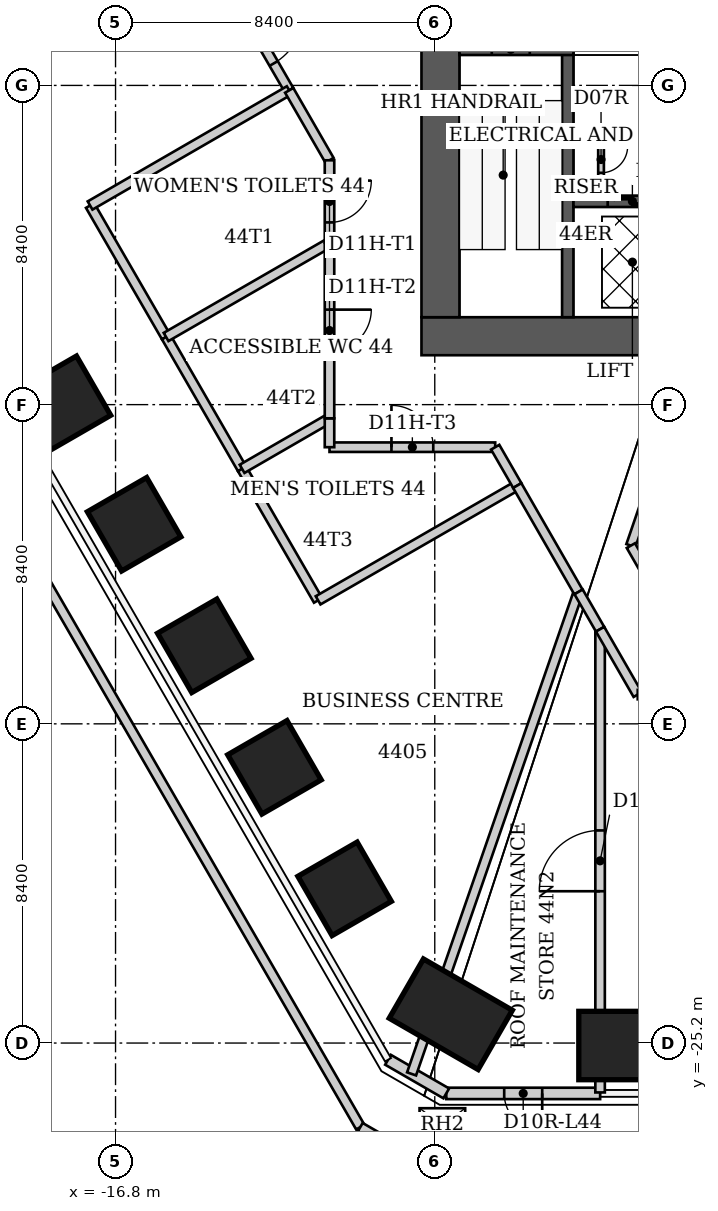
"""IFC4 building model, lengths in metres.
Left out: names, types, materials, properties, quantities, classifications, styles, units other than length and angle.
Written with IfcOpenShell. Run it as: python <this file> out.ifc"""

import sys

from ifc_helpers import new_model, si_unit, direction, frame, frame_2d, origin, origin_2d, place, context, subcontext, project, spatial, rectangle, extrude, clip, halfspace, element, fill, save


model = new_model("IFC4")
c1 = context("Model", 3, precision=1e-05, world=origin(), true_north=direction((0.0, 1.0)))
c2 = subcontext(c1, "Body", "Model", "MODEL_VIEW")
j1 = project(units=[si_unit("LENGTHUNIT", "METRE"), si_unit("PLANEANGLEUNIT", "RADIAN")], contexts=[c1])
p1 = place(None, origin())
s1 = spatial("IfcSite", under=j1, at=p1, CompositionType="ELEMENT")
p2 = place(p1, origin())
s2 = spatial("IfcBuilding", under=s1, at=p2, CompositionType="ELEMENT")
p3 = place(p2, frame((0.0, 0.0, 178.2)))
s3 = spatial("IfcBuildingStorey", under=s2, at=p3, CompositionType="ELEMENT", Elevation=178.2)
p4 = place(p3, frame((-3.71, -25.265, -0.061), z_axis=(0.0, 0.0, 1.0), x_axis=(0.0, -1.0, 0.0)))
e1 = element("IfcColumn", 1, at=p4, inside=s3, PredefinedType="COLUMN", context=c2, shape_type="SweptSolid", body=[
    clip(extrude(rectangle(XDim=1.8, YDim=1.8, at=origin_2d()), origin(), (0.0, 0.0, 1.0), 5.061), halfspace(frame((0.0, 0.0, 0.061)), True)),
])
p5 = place(p3, frame((-7.979, -24.442, -0.071), z_axis=(0.0, 0.0, 1.0), x_axis=(-0.5, -0.866025403784, 0.0)))
e2 = element("IfcColumn", 2, at=p5, inside=s3, PredefinedType="COLUMN", context=c2, shape_type="SweptSolid", body=[
    clip(extrude(rectangle(XDim=1.8, YDim=2.7, at=origin_2d()), origin(), (0.0, 0.0, 1.0), 5.071), halfspace(frame((0.0, 0.0, 0.071)), True)),
])
p6 = place(p3, frame((-10.772, -21.142, -0.07), z_axis=(0.0, 0.0, 1.0), x_axis=(-0.866025403784, -0.5, 0.0)))
e3 = element("IfcColumn", 3, at=p6, inside=s3, PredefinedType="COLUMN", context=c2, shape_type="SweptSolid", body=[
    clip(extrude(rectangle(XDim=1.8, YDim=1.8, at=origin_2d()), origin(), (0.0, 0.0, 1.0), 5.07), halfspace(frame((0.0, 0.0, 0.07)), True)),
])
p7 = place(p3, frame((-12.618, -17.945, -0.062), z_axis=(0.0, 0.0, 1.0), x_axis=(-0.866025403784, -0.5, 0.0)))
e4 = element("IfcColumn", 4, at=p7, inside=s3, PredefinedType="COLUMN", context=c2, shape_type="SweptSolid", body=[
    clip(extrude(rectangle(XDim=1.8, YDim=1.8, at=origin_2d()), origin(), (0.0, 0.0, 1.0), 5.062), halfspace(frame((0.0, 0.0, 0.062)), True)),
])
p8 = place(p3, frame((-14.465, -14.747, -0.054), z_axis=(0.0, 0.0, 1.0), x_axis=(-0.866025403784, -0.5, 0.0)))
e5 = element("IfcColumn", 5, at=p8, inside=s3, PredefinedType="COLUMN", context=c2, shape_type="SweptSolid", body=[
    clip(extrude(rectangle(XDim=1.8, YDim=1.8, at=origin_2d()), origin(), (0.0, 0.0, 1.0), 5.054), halfspace(frame((0.0, 0.0, 0.054)), True)),
])
for number, where, z_axis, x_axis in (
    (6, (-16.311, -11.549, -0.046), (0.0, 0.0, 1.0), (-0.866, -0.5, 0.0)),
    (7, (-18.157, -8.351, -0.046), (0.0, 0.0, 1.0), (-0.866, -0.5, 0.0)),
):
    element("IfcColumn", number, at=place(p3, frame(where, z_axis=z_axis, x_axis=x_axis)), inside=s3, PredefinedType="COLUMN", context=c2, shape_type="SweptSolid", body=[
        clip(extrude(rectangle(XDim=1.8, YDim=1.8, at=origin_2d()), origin(), (0.0, 0.0, 1.0), 5.046), halfspace(frame((0.0, 0.0, 0.046)), True)),
    ])
p9 = place(p3, frame((-8.75, -6.6, 0.0), z_axis=(0.0, 0.0, 1.0), x_axis=(1.0, 0.0, 0.0)))
e8 = element("IfcWall", 8, at=p9, inside=s3, PredefinedType="SHEAR", context=c2, shape_type="SweptSolid", body=[
    extrude(rectangle(XDim=17.5, YDim=1.0, at=frame_2d((8.75, 0.0))), origin(), (0.0, 0.0, 1.0), 5.0),
])
p10 = place(p3, frame((-8.25, -6.1, 0.0), z_axis=(0.0, 0.0, 1.0), x_axis=(0.0, 1.0, 0.0)))
e9 = element("IfcWall", 9, at=p10, inside=s3, PredefinedType="SHEAR", context=c2, shape_type="SweptSolid", body=[
    extrude(rectangle(XDim=12.2, YDim=1.0, at=frame_2d((6.1, 0.0))), origin(), (0.0, 0.0, 1.0), 5.0),
])
p11 = place(p10, frame((7.6, 0.0, 0.0)))
e10 = element("IfcOpeningElement", 10, at=p11, cuts=e9, PredefinedType="OPENING", context=c2, shape_type="SweptSolid", body=[
    extrude(rectangle(XDim=1.2, YDim=2.2, at=frame_2d((0.6, 1.1))), frame((0.0, 0.5, 0.0), z_axis=(0.0, -1.0, 0.0), x_axis=(1.0, 0.0, 0.0)), (0.0, 0.0, 1.0), 1.0),
])
p12 = place(p3, frame((-4.9, -6.1, 0.0), z_axis=(0.0, 0.0, 1.0), x_axis=(0.0, 1.0, 0.0)))
e11 = element("IfcWall", 11, at=p12, inside=s3, PredefinedType="SHEAR", context=c2, shape_type="SweptSolid", body=[
    extrude(rectangle(XDim=7.2, YDim=0.3, at=frame_2d((3.6, 0.0))), origin(), (0.0, 0.0, 1.0), 5.0),
])
p13 = place(p3, frame((-7.75, 0.95, 0.0), z_axis=(0.0, 0.0, 1.0), x_axis=(1.0, 0.0, 0.0)))
e12 = element("IfcWall", 12, at=p13, inside=s3, PredefinedType="SHEAR", context=c2, shape_type="SweptSolid", body=[
    extrude(rectangle(XDim=3.0, YDim=0.3, at=frame_2d((1.5, 0.0))), origin(), (0.0, 0.0, 1.0), 5.0),
])
p14 = place(p13, frame((0.85, 0.0, 0.0)))
e13 = element("IfcOpeningElement", 13, at=p14, cuts=e12, PredefinedType="OPENING", context=c2, shape_type="SweptSolid", body=[
    extrude(rectangle(XDim=1.0, YDim=2.2, at=frame_2d((0.5, 1.1))), frame((0.0, 0.15, 0.0), z_axis=(0.0, -1.0, 0.0), x_axis=(1.0, 0.0, 0.0)), (0.0, 0.0, 1.0), 0.3),
])
p15 = place(p3, frame((-4.75, -3.05, 0.0), z_axis=(0.0, 0.0, 1.0), x_axis=(1.0, 0.0, 0.0)))
e14 = element("IfcWall", 14, at=p15, inside=s3, PredefinedType="SHEAR", context=c2, shape_type="SweptSolid", body=[
    extrude(rectangle(XDim=3.1, YDim=0.3, at=frame_2d((1.55, 0.0))), origin(), (0.0, 0.0, 1.0), 5.0),
])
p16 = place(p15, frame((0.9, 0.0, 0.0)))
e15 = element("IfcOpeningElement", 15, at=p16, cuts=e14, PredefinedType="OPENING", context=c2, shape_type="SweptSolid", body=[
    extrude(rectangle(XDim=1.3, YDim=2.1, at=frame_2d((0.65, 1.05))), frame((0.0, 0.15, 0.0), z_axis=(0.0, -1.0, 0.0), x_axis=(1.0, 0.0, 0.0)), (0.0, 0.0, 1.0), 0.3),
])
p17 = place(p3, frame((-4.049, -26.525, 0.0), z_axis=(0.0, 0.0, 1.0), x_axis=(-1.0, 0.0, 0.0)))
e16 = element("IfcWall", 16, at=p17, inside=s3, PredefinedType="SOLIDWALL", context=c2, shape_type="SweptSolid", body=[
    extrude(rectangle(XDim=4.049, YDim=0.3, at=frame_2d((2.024, 0.0))), origin(), (0.0, 0.0, 1.0), 4.84),
])
p18 = place(p17, frame((1.524, 0.0, 0.0)))
e17 = element("IfcOpeningElement", 17, at=p18, cuts=e16, PredefinedType="OPENING", context=c2, shape_type="SweptSolid", body=[
    extrude(rectangle(XDim=1.0, YDim=2.2, at=frame_2d((0.5, 1.1))), frame((0.0, 0.15, 0.0), z_axis=(0.0, -1.0, 0.0), x_axis=(1.0, 0.0, 0.0)), (0.0, 0.0, 1.0), 0.3),
])
p19 = place(p3, frame((-8.097, -26.525, 0.0), z_axis=(0.0, 0.0, 1.0), x_axis=(-0.866036293601, 0.499981137809, 0.0)))
e18 = element("IfcWall", 18, at=p19, inside=s3, PredefinedType="SOLIDWALL", context=c2, shape_type="SweptSolid", body=[
    extrude(rectangle(XDim=1.77, YDim=0.3, at=frame_2d((0.885, 0.0))), origin(), (0.0, 0.0, 1.0), 4.84),
])
p20 = place(p3, frame((-28.919, 4.734, 0.0), z_axis=(0.0, 0.0, 1.0), x_axis=(0.500001430823, -0.866024577697, 0.0)))
e19 = element("IfcWall", 19, at=p20, inside=s3, PredefinedType="PARAPET", context=c2, shape_type="SweptSolid", body=[
    extrude(rectangle(XDim=37.119, YDim=0.25, at=frame_2d((18.56, 0.0))), origin(), (0.0, 0.0, 1.0), 1.1),
])
p21 = place(p3, frame((-10.36, -27.412, 0.0), z_axis=(0.0, 0.0, 1.0), x_axis=(0.865515622283, -0.500881929783, 0.0)))
e20 = element("IfcWall", 20, at=p21, inside=s3, PredefinedType="PARAPET", context=c2, shape_type="SweptSolid", body=[
    extrude(rectangle(XDim=1.871, YDim=0.25, at=frame_2d((0.935, 0.0))), origin(), (0.0, 0.0, 1.0), 1.1),
])
p22 = place(p3, frame((-17.47, -3.16, 0.0), z_axis=(0.0, 0.0, 1.0), x_axis=(0.50044857655, -0.865766263046, 0.0)))
e21 = element("IfcWall", 21, at=p22, inside=s3, PredefinedType="PARTITIONING", context=c2, shape_type="SweptSolid", body=[
    extrude(rectangle(XDim=3.996, YDim=0.25, at=frame_2d((1.998, 0.0))), origin(), (0.0, 0.0, 1.0), 4.84),
])
p23 = place(p3, frame((-15.47, -6.62, 0.0), z_axis=(0.0, 0.0, 1.0), x_axis=(0.499365324853, -0.866391523697, 0.0)))
e22 = element("IfcWall", 22, at=p23, inside=s3, PredefinedType="PARTITIONING", context=c2, shape_type="SweptSolid", body=[
    extrude(rectangle(XDim=4.005, YDim=0.25, at=frame_2d((2.002, 0.0))), origin(), (0.0, 0.0, 1.0), 4.84),
])
p24 = place(p3, frame((-13.85, 2.67, 0.0), z_axis=(0.0, 0.0, 1.0), x_axis=(0.50081313458, -0.865555431057, 0.0)))
e23 = element("IfcWall", 23, at=p24, inside=s3, PredefinedType="PARTITIONING", context=c2, shape_type="SweptSolid", body=[
    extrude(rectangle(XDim=3.235, YDim=0.25, at=frame_2d((1.617, 0.0))), origin(), (0.0, 0.0, 1.0), 4.84),
])
p25 = place(p24, frame((0.817, 0.0, 0.0)))
e24 = element("IfcOpeningElement", 24, at=p25, cuts=e23, PredefinedType="OPENING", context=c2, shape_type="SweptSolid", body=[
    extrude(rectangle(XDim=1.6, YDim=2.4, at=frame_2d((0.8, 1.2))), frame((0.0, 0.125, 0.0), z_axis=(0.0, -1.0, 0.0), x_axis=(1.0, 0.0, 0.0)), (0.0, 0.0, 1.0), 0.25),
])
p26 = place(p3, frame((-13.47, -10.09, 0.0), z_axis=(0.0, 0.0, 1.0), x_axis=(0.50044857655, -0.865766263046, 0.0)))
e25 = element("IfcWall", 25, at=p26, inside=s3, PredefinedType="PARTITIONING", context=c2, shape_type="SweptSolid", body=[
    extrude(rectangle(XDim=3.996, YDim=0.25, at=frame_2d((1.998, 0.0))), origin(), (0.0, 0.0, 1.0), 4.84),
])
p27 = place(p3, frame((-12.23, -0.13, 0.0), z_axis=(0.0, 0.0, 1.0), x_axis=(-0.865687585241, -0.500584662928, 0.0)))
e26 = element("IfcWall", 26, at=p27, inside=s3, PredefinedType="PARTITIONING", context=c2, shape_type="SweptSolid", body=[
    extrude(rectangle(XDim=6.053, YDim=0.25, at=frame_2d((3.026, 0.0))), origin(), (0.0, 0.0, 1.0), 4.84),
])
p28 = place(p3, frame((-12.23, -0.13, 0.0), z_axis=(0.0, 0.0, 1.0), x_axis=(0.499181595673, -0.866497394423, 0.0)))
e27 = element("IfcWall", 27, at=p28, inside=s3, PredefinedType="PARTITIONING", context=c2, shape_type="SweptSolid", body=[
    extrude(rectangle(XDim=2.124, YDim=0.25, at=frame_2d((1.062, 0.0))), origin(), (0.0, 0.0, 1.0), 4.84),
])
p29 = place(p3, frame((-11.47, -13.55, 0.0), z_axis=(0.0, 0.0, 1.0), x_axis=(0.866403916982, 0.499343822069, 0.0)))
e28 = element("IfcWall", 28, at=p29, inside=s3, PredefinedType="PARTITIONING", context=c2, shape_type="SweptSolid", body=[
    extrude(rectangle(XDim=6.048, YDim=0.25, at=frame_2d((3.024, 0.0))), origin(), (0.0, 0.0, 1.0), 4.84),
])
p30 = place(p3, frame((-11.17, -9.52, 0.0), z_axis=(0.0, 0.0, 1.0), x_axis=(1.0, 0.0, 0.0)))
e29 = element("IfcWall", 29, at=p30, inside=s3, PredefinedType="PARTITIONING", context=c2, shape_type="SweptSolid", body=[
    extrude(rectangle(XDim=4.36, YDim=0.25, at=frame_2d((2.18, 0.0))), origin(), (0.0, 0.0, 1.0), 4.84),
])
p31 = place(p30, frame((1.63, 0.0, 0.0)))
e30 = element("IfcOpeningElement", 30, at=p31, cuts=e29, PredefinedType="OPENING", context=c2, shape_type="SweptSolid", body=[
    extrude(rectangle(XDim=1.1, YDim=2.2, at=frame_2d((0.55, 1.1))), frame((0.0, 0.125, 0.0), z_axis=(0.0, -1.0, 0.0), x_axis=(1.0, 0.0, 0.0)), (0.0, 0.0, 1.0), 0.25),
])
p32 = place(p3, frame((-11.17, -8.76, 0.0), z_axis=(0.0, 0.0, 1.0), x_axis=(-0.865675724273, -0.500605174168, 0.0)))
e31 = element("IfcWall", 31, at=p32, inside=s3, PredefinedType="PARTITIONING", context=c2, shape_type="SweptSolid", body=[
    extrude(rectangle(XDim=2.657, YDim=0.25, at=frame_2d((1.329, 0.0))), origin(), (0.0, 0.0, 1.0), 4.84),
])
p33 = place(p3, frame((-11.17, -8.76, 0.0), z_axis=(0.0, 0.0, 1.0), x_axis=(0.0, -1.0, 0.0)))
e32 = element("IfcWall", 32, at=p33, inside=s3, PredefinedType="PARTITIONING", context=c2, shape_type="SweptSolid", body=[
    extrude(rectangle(XDim=0.76, YDim=0.25, at=frame_2d((0.38, 0.0))), origin(), (0.0, 0.0, 1.0), 4.84),
])
p34 = place(p3, frame((-11.17, -4.14, 0.0), z_axis=(0.0, 0.0, 1.0), x_axis=(-0.866235527521, -0.499635878276, 0.0)))
e33 = element("IfcWall", 33, at=p34, inside=s3, PredefinedType="PARTITIONING", context=c2, shape_type="SweptSolid", body=[
    extrude(rectangle(XDim=4.964, YDim=0.25, at=frame_2d((2.482, 0.0))), origin(), (0.0, 0.0, 1.0), 4.84),
])
p35 = place(p3, frame((-11.17, -4.14, 0.0), z_axis=(0.0, 0.0, 1.0), x_axis=(0.0, -1.0, 0.0)))
e34 = element("IfcWall", 34, at=p35, inside=s3, PredefinedType="PARTITIONING", context=c2, shape_type="SweptSolid", body=[
    extrude(rectangle(XDim=4.62, YDim=0.25, at=frame_2d((2.31, 0.0))), origin(), (0.0, 0.0, 1.0), 4.84),
])
p36 = place(p35, frame((1.76, 0.0, 0.0)))
e35 = element("IfcOpeningElement", 35, at=p36, cuts=e34, PredefinedType="OPENING", context=c2, shape_type="SweptSolid", body=[
    extrude(rectangle(XDim=1.1, YDim=2.2, at=frame_2d((0.55, 1.1))), frame((0.0, 0.125, 0.0), z_axis=(0.0, -1.0, 0.0), x_axis=(1.0, 0.0, 0.0)), (0.0, 0.0, 1.0), 0.25),
])
p37 = place(p3, frame((-11.17, -1.97, 0.0), z_axis=(0.0, 0.0, 1.0), x_axis=(0.0, -1.0, 0.0)))
e36 = element("IfcWall", 36, at=p37, inside=s3, PredefinedType="PARTITIONING", context=c2, shape_type="SweptSolid", body=[
    extrude(rectangle(XDim=2.17, YDim=0.25, at=frame_2d((1.085, 0.0))), origin(), (0.0, 0.0, 1.0), 4.84),
])
p38 = place(p37, frame((0.535, 0.0, 0.0)))
e37 = element("IfcOpeningElement", 37, at=p38, cuts=e36, PredefinedType="OPENING", context=c2, shape_type="SweptSolid", body=[
    extrude(rectangle(XDim=1.1, YDim=2.2, at=frame_2d((0.55, 1.1))), frame((0.0, 0.125, 0.0), z_axis=(0.0, -1.0, 0.0), x_axis=(1.0, 0.0, 0.0)), (0.0, 0.0, 1.0), 0.25),
])
p39 = place(p3, frame((-6.81, -9.52, 0.0), z_axis=(0.0, 0.0, 1.0), x_axis=(0.499341299954, -0.866405370575, 0.0)))
e38 = element("IfcWall", 38, at=p39, inside=s3, PredefinedType="PARTITIONING", context=c2, shape_type="SweptSolid", body=[
    extrude(rectangle(XDim=1.165, YDim=0.25, at=frame_2d((0.582, 0.0))), origin(), (0.0, 0.0, 1.0), 4.84),
])
p40 = place(p3, frame((-4.62, -13.33, 0.0), z_axis=(0.0, 0.0, 1.0), x_axis=(-0.327133057776, -0.944978286793, 0.0)))
e39 = element("IfcWall", 39, at=p40, inside=s3, PredefinedType="PARTITIONING", context=c2, shape_type="SweptSolid", body=[
    extrude(rectangle(XDim=13.42, YDim=0.25, at=frame_2d((6.71, 0.0))), origin(), (0.0, 0.0, 1.0), 4.84),
])
p41 = place(p3, frame((-4.62, -13.33, 0.0), z_axis=(0.0, 0.0, 1.0), x_axis=(-0.49848958573, 0.86689568745, 0.0)))
e40 = element("IfcWall", 40, at=p41, inside=s3, PredefinedType="PARTITIONING", context=c2, shape_type="SweptSolid", body=[
    extrude(rectangle(XDim=3.23, YDim=0.25, at=frame_2d((1.615, 0.0))), origin(), (0.0, 0.0, 1.0), 4.84),
])
p42 = place(p3, frame((-4.05, -26.5, 0.0), z_axis=(0.0, 0.0, 1.0), x_axis=(0.0, 1.0, 0.0)))
e41 = element("IfcWall", 41, at=p42, inside=s3, PredefinedType="PARTITIONING", context=c2, shape_type="SweptSolid", body=[
    extrude(rectangle(XDim=12.19, YDim=0.25, at=frame_2d((6.095, 0.0))), origin(), (0.0, 0.0, 1.0), 4.84),
])
p43 = place(p42, frame((5.295, 0.0, 0.0)))
e42 = element("IfcOpeningElement", 42, at=p43, cuts=e41, PredefinedType="OPENING", context=c2, shape_type="SweptSolid", body=[
    extrude(rectangle(XDim=1.6, YDim=2.4, at=frame_2d((0.8, 1.2))), frame((0.0, 0.125, 0.0), z_axis=(0.0, -1.0, 0.0), x_axis=(1.0, 0.0, 0.0)), (0.0, 0.0, 1.0), 0.25),
])
p44 = place(p3, frame((-4.05, -14.31, 0.0), z_axis=(0.0, 0.0, 1.0), x_axis=(-0.498895837979, 0.866661954194, 0.0)))
e43 = element("IfcWall", 43, at=p44, inside=s3, PredefinedType="PARTITIONING", context=c2, shape_type="SweptSolid", body=[
    extrude(rectangle(XDim=1.134, YDim=0.25, at=frame_2d((0.567, 0.0))), origin(), (0.0, 0.0, 1.0), 4.84),
])
p45 = place(p3, frame((-4.05, -14.31, 0.0), z_axis=(0.0, 0.0, 1.0), x_axis=(0.498852448655, -0.866686929907, 0.0)))
e44 = element("IfcWall", 44, at=p45, inside=s3, PredefinedType="PARTITIONING", context=c2, shape_type="SweptSolid", body=[
    extrude(rectangle(XDim=1.985, YDim=0.25, at=frame_2d((0.992, 0.0))), origin(), (0.0, 0.0, 1.0), 4.84),
])
p46 = place(p3, frame((-3.24, -12.11, 0.0), z_axis=(0.0, 0.0, 1.0), x_axis=(0.324932772994, 0.94573711624, 0.0)))
e45 = element("IfcWall", 45, at=p46, inside=s3, PredefinedType="PARTITIONING", context=c2, shape_type="SweptSolid", body=[
    extrude(rectangle(XDim=2.739, YDim=0.25, at=frame_2d((1.369, 0.0))), origin(), (0.0, 0.0, 1.0), 4.84),
])
p47 = place(p3, frame((-3.06, -16.03, 0.0), z_axis=(0.0, 0.0, 1.0), x_axis=(1.0, 0.0, 0.0)))
e46 = element("IfcWall", 46, at=p47, inside=s3, PredefinedType="PARTITIONING", context=c2, shape_type="SweptSolid", body=[
    extrude(rectangle(XDim=6.12, YDim=0.25, at=frame_2d((3.06, 0.0))), origin(), (0.0, 0.0, 1.0), 4.84),
])
p48 = place(p47, frame((2.51, 0.0, 0.0)))
e47 = element("IfcOpeningElement", 47, at=p48, cuts=e46, PredefinedType="OPENING", context=c2, shape_type="SweptSolid", body=[
    extrude(rectangle(XDim=1.1, YDim=2.2, at=frame_2d((0.55, 1.1))), frame((0.0, 0.125, 0.0), z_axis=(0.0, -1.0, 0.0), x_axis=(1.0, 0.0, 0.0)), (0.0, 0.0, 1.0), 0.25),
])
p49 = place(p3, frame((-2.02, -14.23, 0.0), z_axis=(0.0, 0.0, 1.0), x_axis=(-0.498748634132, 0.866746675766, 0.0)))
e48 = element("IfcWall", 48, at=p49, inside=s3, PredefinedType="PARTITIONING", context=c2, shape_type="SweptSolid", body=[
    extrude(rectangle(XDim=2.446, YDim=0.25, at=frame_2d((1.223, 0.0))), origin(), (0.0, 0.0, 1.0), 4.84),
])
p50 = place(p3, frame((-4.025, -2.9, 0.0), z_axis=(0.0, 0.0, 1.0), x_axis=(0.0, 1.0, 0.0)))
e49 = element("IfcWall", 49, at=p50, inside=s3, PredefinedType="PARTITIONING", context=c2, shape_type="SweptSolid", body=[
    extrude(rectangle(XDim=1.775, YDim=0.15, at=frame_2d((0.887, 0.0))), origin(), (0.0, 0.0, 1.0), 4.84),
])
p51 = place(p50, frame((0.6, 0.0, 0.0)))
e50 = element("IfcOpeningElement", 50, at=p51, cuts=e49, PredefinedType="OPENING", context=c2, shape_type="SweptSolid", body=[
    extrude(rectangle(XDim=0.7, YDim=2.1, at=frame_2d((0.35, 1.05))), frame((0.0, 0.075, 0.0), z_axis=(0.0, -1.0, 0.0), x_axis=(1.0, 0.0, 0.0)), (0.0, 0.0, 1.0), 0.15),
])
p52 = place(p3, frame((-4.75, -1.2, 0.0), z_axis=(0.0, 0.0, 1.0), x_axis=(1.0, 0.0, 0.0)))
e51 = element("IfcWall", 51, at=p52, inside=s3, PredefinedType="PARTITIONING", context=c2, shape_type="SweptSolid", body=[
    extrude(rectangle(XDim=0.8, YDim=0.15, at=frame_2d((0.4, 0.0))), origin(), (0.0, 0.0, 1.0), 4.84),
])
p53 = place(p18, origin())
e52 = element("IfcDoor", 52, at=p53, inside=s3, OperationType="SINGLE_SWING_LEFT", PredefinedType="DOOR", context=c2, shape_type="SweptSolid", body=[
    extrude(rectangle(XDim=1.0, YDim=2.2, at=frame_2d((0.5, 1.1))), frame((0.0, 0.025, 0.0), z_axis=(0.0, -1.0, 0.0), x_axis=(1.0, 0.0, 0.0)), (0.0, 0.0, 1.0), 0.05),
])
fill(e17, e52)
p54 = place(p3, frame((0.0, 0.0, -0.2)))
p55 = place(p54, frame((-8.2, -27.365, 0.0)))
p56 = place(p55, frame((0.0, 0.0, 0.15)))
e53 = element("IfcWindow", 53, at=p56, inside=s3, PartitioningType="SINGLE_PANEL", PredefinedType="SKYLIGHT", context=c2, shape_type="SweptSolid", body=[
    extrude(rectangle(XDim=1.2, YDim=0.9, at=origin_2d()), origin(), (0.0, 0.0, 1.0), 0.05),
])
p57 = place(p25, origin())
e54 = element("IfcDoor", 54, at=p57, inside=s3, OperationType="DOUBLE_DOOR_SINGLE_SWING", PredefinedType="DOOR", context=c2, shape_type="SweptSolid", body=[
    extrude(rectangle(XDim=1.6, YDim=2.4, at=frame_2d((0.8, 1.2))), frame((0.0, 0.025, 0.0), z_axis=(0.0, -1.0, 0.0), x_axis=(1.0, 0.0, 0.0)), (0.0, 0.0, 1.0), 0.05),
])
fill(e24, e54)
p58 = place(p38, origin())
e55 = element("IfcDoor", 55, at=p58, inside=s3, OperationType="SINGLE_SWING_LEFT", PredefinedType="DOOR", context=c2, shape_type="SweptSolid", body=[
    extrude(rectangle(XDim=1.1, YDim=2.2, at=frame_2d((0.55, 1.1))), frame((0.0, 0.025, 0.0), z_axis=(0.0, -1.0, 0.0), x_axis=(1.0, 0.0, 0.0)), (0.0, 0.0, 1.0), 0.05),
])
fill(e37, e55)
p59 = place(p36, origin())
e56 = element("IfcDoor", 56, at=p59, inside=s3, OperationType="SINGLE_SWING_LEFT", PredefinedType="DOOR", context=c2, shape_type="SweptSolid", body=[
    extrude(rectangle(XDim=1.1, YDim=2.2, at=frame_2d((0.55, 1.1))), frame((0.0, 0.025, 0.0), z_axis=(0.0, -1.0, 0.0), x_axis=(1.0, 0.0, 0.0)), (0.0, 0.0, 1.0), 0.05),
])
fill(e35, e56)
p60 = place(p31, origin())
e57 = element("IfcDoor", 57, at=p60, inside=s3, OperationType="SINGLE_SWING_LEFT", PredefinedType="DOOR", context=c2, shape_type="SweptSolid", body=[
    extrude(rectangle(XDim=1.1, YDim=2.2, at=frame_2d((0.55, 1.1))), frame((0.0, 0.025, 0.0), z_axis=(0.0, -1.0, 0.0), x_axis=(1.0, 0.0, 0.0)), (0.0, 0.0, 1.0), 0.05),
])
fill(e30, e57)
p61 = place(p43, origin())
e58 = element("IfcDoor", 58, at=p61, inside=s3, OperationType="DOUBLE_DOOR_SINGLE_SWING", PredefinedType="DOOR", context=c2, shape_type="SweptSolid", body=[
    extrude(rectangle(XDim=1.6, YDim=2.4, at=frame_2d((0.8, 1.2))), frame((0.0, 0.025, 0.0), z_axis=(0.0, -1.0, 0.0), x_axis=(1.0, 0.0, 0.0)), (0.0, 0.0, 1.0), 0.05),
])
fill(e42, e58)
p62 = place(p51, origin())
e59 = element("IfcDoor", 59, at=p62, inside=s3, OperationType="SINGLE_SWING_RIGHT", PredefinedType="DOOR", context=c2, shape_type="SweptSolid", body=[
    extrude(rectangle(XDim=0.7, YDim=2.1, at=frame_2d((0.35, 1.05))), frame((0.0, 0.025, 0.0), z_axis=(0.0, -1.0, 0.0), x_axis=(1.0, 0.0, 0.0)), (0.0, 0.0, 1.0), 0.05),
])
fill(e50, e59)
p63 = place(p16, origin())
e60 = element("IfcDoor", 60, at=p63, inside=s3, OperationType="DOUBLE_DOOR_SLIDING", PredefinedType="DOOR", context=c2, shape_type="SweptSolid", body=[
    extrude(rectangle(XDim=1.3, YDim=2.1, at=frame_2d((0.65, 1.05))), frame((0.0, 0.025, 0.0), z_axis=(0.0, -1.0, 0.0), x_axis=(1.0, 0.0, 0.0)), (0.0, 0.0, 1.0), 0.05),
])
fill(e15, e60)
save(model, sys.argv[1])
